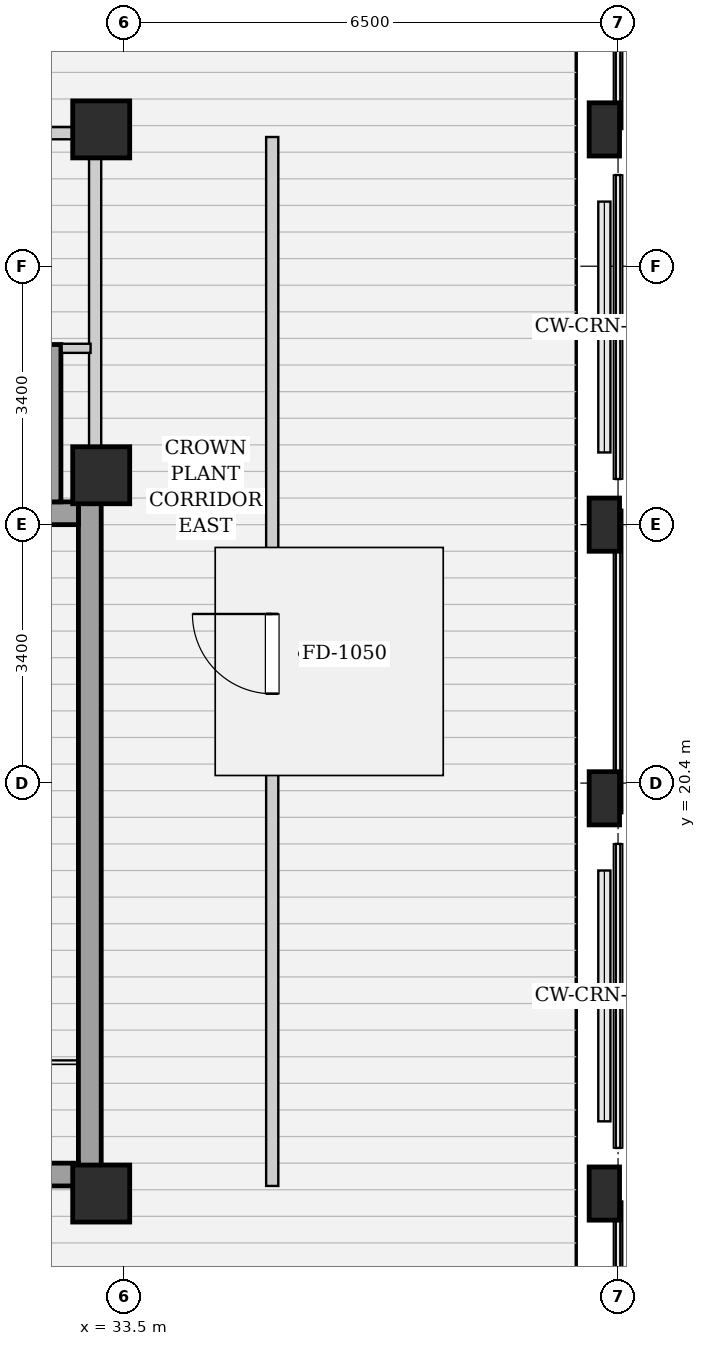
"""IFC4 building model, lengths in metres.
Left out: names, types, materials, properties, quantities, classifications, styles, units other than length and angle.
Written with IfcOpenShell. Run it as: python <this file> out.ifc"""

import sys

from ifc_helpers import new_model, si_unit, direction, frame, frame_2d, origin, origin_2d, place, context, subcontext, project, spatial, rectangle, hollow_rectangle, extrude, element, fill, save


model = new_model("IFC4")
c1 = context("Model", 3, precision=1e-05, world=origin(), true_north=direction((0.0, 1.0)))
c2 = subcontext(c1, "Body", "Model", "MODEL_VIEW")
j1 = project(units=[si_unit("LENGTHUNIT", "METRE"), si_unit("PLANEANGLEUNIT", "RADIAN")], contexts=[c1])
p1 = place(None, origin())
s1 = spatial("IfcSite", under=j1, at=p1, CompositionType="ELEMENT")
p2 = place(p1, origin())
s2 = spatial("IfcBuilding", under=s1, at=p2, CompositionType="ELEMENT")
p3 = place(p2, frame((0.0, 0.0, 261.5)))
s3 = spatial("IfcBuildingStorey", under=s2, at=p3, CompositionType="ELEMENT", Elevation=261.5)
for number, where, z_axis, x_axis in (
    (1, (39.82, 15.0, 0.035), (0.0, 0.0, 1.0), (1.0, 0.0, 0.0)),
    (2, (39.82, 20.2, 0.035), (0.0, 0.0, 1.0), (1.0, 0.0, 0.0)),
    (3, (39.82, 23.8, 0.035), (0.0, 0.0, 1.0), (1.0, 0.0, 0.0)),
    (4, (39.82, 29.0, 0.035), (0.0, 0.0, 1.0), (1.0, 0.0, 0.0)),
):
    element("IfcColumn", number, at=place(p3, frame(where, z_axis=z_axis, x_axis=x_axis)), inside=s3, PredefinedType="USERDEFINED", context=c2, shape_type="SweptSolid", body=[
        extrude(hollow_rectangle(XDim=0.4, YDim=0.7, WallThickness=0.02, InnerFilletRadius=0.02, OuterFilletRadius=0.04, at=origin_2d()), origin(), (0.0, 0.0, 1.0), 13.115),
    ])
for number, where, z_axis, x_axis in (
    (5, (33.2, 15.0, 0.0), (0.0, 0.0, 1.0), (1.0, 0.0, 0.0)),
    (6, (33.2, 29.0, 0.0), (0.0, 0.0, 1.0), (1.0, 0.0, 0.0)),
    (7, (33.2, 24.45, 0.0), (0.0, 0.0, 1.0), (1.0, 0.0, 0.0)),
):
    element("IfcColumn", number, at=place(p3, frame(where, z_axis=z_axis, x_axis=x_axis)), inside=s3, PredefinedType="COLUMN", context=c2, shape_type="SweptSolid", body=[
        extrude(rectangle(XDim=0.75, YDim=0.75, at=origin_2d()), origin(), (0.0, 0.0, 1.0), 12.95),
    ])
p4 = place(p3, frame((33.05, 15.1, 0.0), z_axis=(0.0, 0.0, 1.0), x_axis=(0.0, 1.0, 0.0)))
e8 = element("IfcWall", 8, at=p4, inside=s3, PredefinedType="SHEAR", context=c2, shape_type="SweptSolid", body=[
    extrude(rectangle(XDim=9.0, YDim=0.3, at=frame_2d((4.5, 0.0))), origin(), (0.0, 0.0, 1.0), 13.2),
])
p5 = place(p3, frame((30.05, 23.95, 0.0), z_axis=(0.0, 0.0, 1.0), x_axis=(1.0, 0.0, 0.0)))
e9 = element("IfcWall", 9, at=p5, inside=s3, PredefinedType="SHEAR", context=c2, shape_type="SweptSolid", body=[
    extrude(rectangle(XDim=2.85, YDim=0.3, at=frame_2d((1.425, 0.0))), origin(), (0.0, 0.0, 1.0), 13.2),
])
p6 = place(p3, frame((30.05, 15.25, 0.0), z_axis=(0.0, 0.0, 1.0), x_axis=(1.0, 0.0, 0.0)))
e10 = element("IfcWall", 10, at=p6, inside=s3, PredefinedType="SHEAR", context=c2, shape_type="SweptSolid", body=[
    extrude(rectangle(XDim=2.85, YDim=0.3, at=frame_2d((1.425, 0.0))), origin(), (0.0, 0.0, 1.0), 13.2),
])
p7 = place(p6, frame((0.86, 0.0, 0.0)))
e11 = element("IfcOpeningElement", 11, at=p7, cuts=e10, PredefinedType="OPENING", context=c2, shape_type="SweptSolid", body=[
    extrude(rectangle(XDim=1.1, YDim=2.05, at=frame_2d((0.55, 1.025))), frame((0.0, 0.16, 0.0), z_axis=(0.0, -1.0, 0.0), x_axis=(1.0, 0.0, 0.0)), (0.0, 0.0, 1.0), 0.32),
])
p8 = place(p3, frame((32.56, 24.1, 0.0), z_axis=(0.0, 0.0, 1.0), x_axis=(0.0, 1.0, 0.0)))
e12 = element("IfcWall", 12, at=p8, inside=s3, PredefinedType="SHEAR", context=c2, shape_type="SweptSolid", body=[
    extrude(rectangle(XDim=2.07, YDim=0.22, at=frame_2d((1.035, 0.0))), origin(), (0.0, 0.0, 1.0), 13.2),
])
p9 = place(p3, frame((33.12, 24.12, 0.0), z_axis=(0.0, 0.0, 1.0), x_axis=(0.0, 1.0, 0.0)))
e13 = element("IfcWall", 13, at=p9, inside=s3, PredefinedType="PARTITIONING", context=c2, shape_type="SweptSolid", body=[
    extrude(rectangle(XDim=4.76, YDim=0.16, at=frame_2d((2.38, 0.0))), origin(), (0.0, 0.0, 1.0), 12.319),
])
p10 = place(p3, frame((32.68, 26.12, 0.0), z_axis=(0.0, 0.0, 1.0), x_axis=(1.0, 0.0, 0.0)))
e14 = element("IfcWall", 14, at=p10, inside=s3, PredefinedType="PARTITIONING", context=c2, shape_type="SweptSolid", body=[
    extrude(rectangle(XDim=0.38, YDim=0.12, at=frame_2d((0.19, 0.0))), origin(), (0.0, 0.0, 1.0), 13.2),
])
p11 = place(p3, frame((30.08, 28.95, 0.0), z_axis=(0.0, 0.0, 1.0), x_axis=(1.0, 0.0, 0.0)))
e15 = element("IfcWall", 15, at=p11, inside=s3, PredefinedType="PARTITIONING", context=c2, shape_type="SweptSolid", body=[
    extrude(rectangle(XDim=2.96, YDim=0.16, at=frame_2d((1.48, 0.0))), origin(), (0.0, 0.0, 1.0), 13.2),
])
p12 = place(p11, frame((1.045, 0.0, 0.0)))
e16 = element("IfcOpeningElement", 16, at=p12, cuts=e15, PredefinedType="OPENING", context=c2, shape_type="SweptSolid", body=[
    extrude(rectangle(XDim=0.86, YDim=2.05, at=frame_2d((0.43, 1.025))), frame((0.0, 0.09, 0.0), z_axis=(0.0, -1.0, 0.0), x_axis=(1.0, 0.0, 0.0)), (0.0, 0.0, 1.0), 0.18),
])
p13 = place(p3, frame((35.45, 15.1, 0.0), z_axis=(0.0, 0.0, 1.0), x_axis=(0.0, 1.0, 0.0)))
e17 = element("IfcWall", 17, at=p13, inside=s3, PredefinedType="PARTITIONING", context=c2, shape_type="SweptSolid", body=[
    extrude(rectangle(XDim=13.8, YDim=0.16, at=frame_2d((6.9, 0.0))), origin(), (0.0, 0.0, 1.0), 13.2),
])
p14 = place(p13, frame((6.475, 0.0, 0.0)))
e18 = element("IfcOpeningElement", 18, at=p14, cuts=e17, PredefinedType="OPENING", context=c2, shape_type="SweptSolid", body=[
    extrude(rectangle(XDim=1.05, YDim=2.05, at=frame_2d((0.525, 1.025))), frame((0.0, 0.09, 0.0), z_axis=(0.0, -1.0, 0.0), x_axis=(1.0, 0.0, 0.0)), (0.0, 0.0, 1.0), 0.18),
])
p15 = place(p14, origin())
e19 = element("IfcDoor", 19, at=p15, inside=s3, OperationType="SINGLE_SWING_RIGHT", PredefinedType="DOOR", context=c2, shape_type="SweptSolid", body=[
    extrude(rectangle(XDim=1.05, YDim=2.05, at=frame_2d((0.525, 1.025))), frame((0.0, 0.025, 0.0), z_axis=(0.0, -1.0, 0.0), x_axis=(1.0, 0.0, 0.0)), (0.0, 0.0, 1.0), 0.05),
])
fill(e18, e19)
save(model, sys.argv[1])
